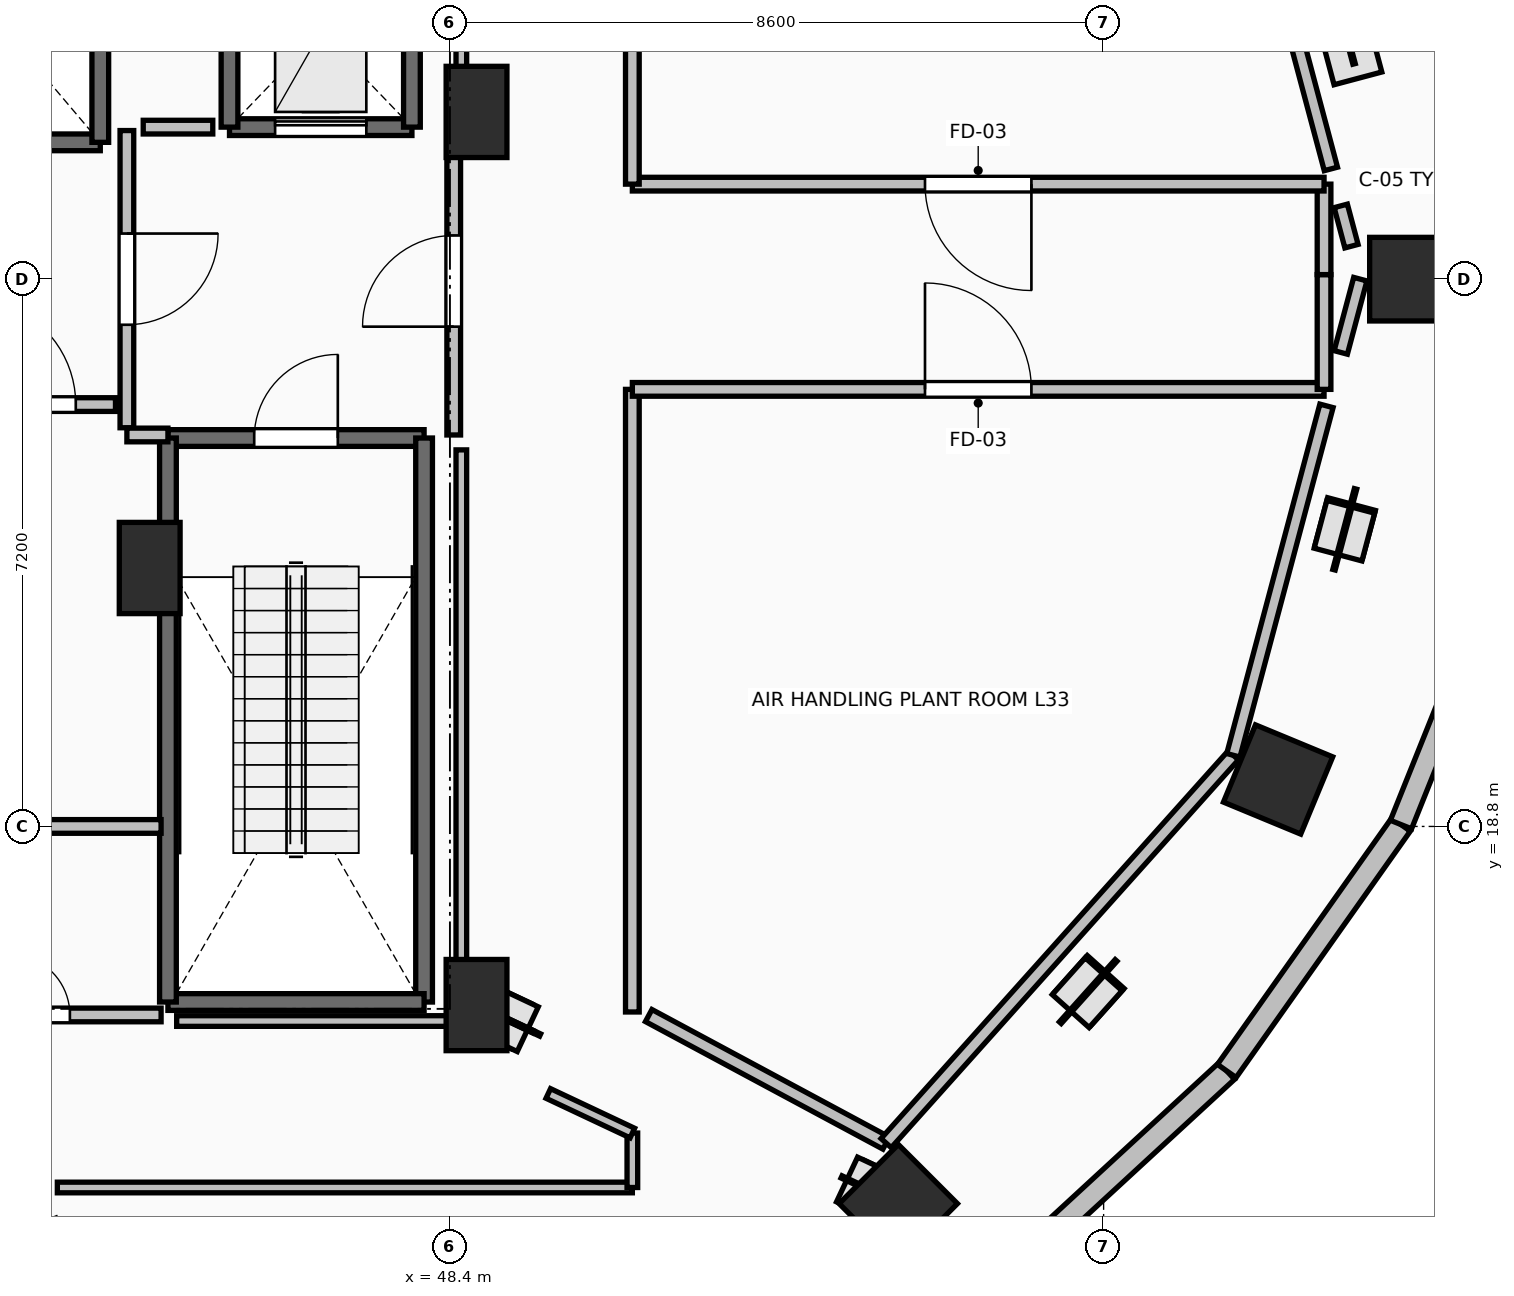
"""IFC4 building model, lengths in metres.
Left out: names, types, materials, properties, quantities, classifications, styles, units other than length and angle.
Written with IfcOpenShell. Run it as: python <this file> out.ifc"""

import sys

from ifc_helpers import new_model, si_unit, direction, frame, frame_2d, origin, origin_2d, place, context, subcontext, project, spatial, rectangle, extrude, element, fill, save


model = new_model("IFC4")
c1 = context("Model", 3, precision=1e-05, world=origin(), true_north=direction((0.0, 1.0)))
c2 = subcontext(c1, "Body", "Model", "MODEL_VIEW")
j1 = project(units=[si_unit("LENGTHUNIT", "METRE"), si_unit("PLANEANGLEUNIT", "RADIAN")], contexts=[c1])
p1 = place(None, origin())
s1 = spatial("IfcSite", under=j1, at=p1, CompositionType="ELEMENT")
p2 = place(p1, origin())
s2 = spatial("IfcBuilding", under=s1, at=p2, CompositionType="ELEMENT")
p3 = place(p2, frame((0.0, 0.0, 124.3)))
s3 = spatial("IfcBuildingStorey", under=s2, at=p3, CompositionType="ELEMENT", Elevation=124.3)
for number, where, z_axis, x_axis in (
    (1, (61.05, 26.0, 0.0), (0.0, 0.0, 1.0), (1.0, 0.0, 0.0)),
    (2, (54.299, 13.838, 0.0), (0.0, 0.0, 1.0), (0.707, -0.707, 0.0)),
    (3, (59.295, 19.418, 0.0), (0.0, 0.0, 1.0), (0.924, -0.383, 0.0)),
):
    element("IfcColumn", number, at=place(p3, frame(where, z_axis=z_axis, x_axis=x_axis)), inside=s3, PredefinedType="COLUMN", context=c2, shape_type="SweptSolid", body=[
        extrude(rectangle(XDim=1.1, YDim=1.1, at=origin_2d()), origin(), (0.0, 0.0, 1.0), 4.8),
    ])
for number, where, z_axis, x_axis in (
    (4, (48.75, 28.2, 0.0), (0.0, 0.0, 1.0), (1.0, 0.0, 0.0)),
    (5, (48.75, 16.45, 0.0), (0.0, 0.0, 1.0), (1.0, 0.0, 0.0)),
    (6, (44.45, 22.2, 0.0), (0.0, 0.0, 1.0), (1.0, 0.0, 0.0)),
):
    element("IfcColumn", number, at=place(p3, frame(where, z_axis=z_axis, x_axis=x_axis)), inside=s3, PredefinedType="PILASTER", context=c2, shape_type="SweptSolid", body=[
        extrude(rectangle(XDim=0.8, YDim=1.2, at=origin_2d()), origin(), (0.0, 0.0, 1.0), 4.8),
    ])
p4 = place(p3, frame((55.536, 12.742, 0.0), z_axis=(0.0, 0.0, 1.0), x_axis=(0.735477154165, 0.677549522693, 0.0)))
e7 = element("IfcWall", 7, at=p4, inside=s3, PredefinedType="STANDARD", context=c2, shape_type="SweptSolid", body=[
    extrude(rectangle(XDim=4.194, YDim=0.3, at=frame_2d((2.097, 0.0))), origin(), (0.0, 0.0, 1.0), 4.54),
])
p5 = place(p3, frame((58.62, 15.583, 0.0), z_axis=(0.0, 0.0, 1.0), x_axis=(0.577269753207, 0.816553508371, 0.0)))
e8 = element("IfcWall", 8, at=p5, inside=s3, PredefinedType="STANDARD", context=c2, shape_type="SweptSolid", body=[
    extrude(rectangle(XDim=3.97, YDim=0.3, at=frame_2d((1.985, 0.0))), origin(), (0.0, 0.0, 1.0), 4.54),
])
p6 = place(p3, frame((60.912, 18.825, 0.0), z_axis=(0.0, 0.0, 1.0), x_axis=(0.372401154411, 0.928071861546, 0.0)))
e9 = element("IfcWall", 9, at=p6, inside=s3, PredefinedType="STANDARD", context=c2, shape_type="SweptSolid", body=[
    extrude(rectangle(XDim=3.79, YDim=0.3, at=frame_2d((1.895, 0.0))), origin(), (0.0, 0.0, 1.0), 4.54),
])
p7 = place(p3, frame((44.69, 23.91, 0.0), z_axis=(0.0, 0.0, 1.0), x_axis=(1.0, 0.0, 0.0)))
e10 = element("IfcWall", 10, at=p7, inside=s3, PredefinedType="SOLIDWALL", context=c2, shape_type="SweptSolid", body=[
    extrude(rectangle(XDim=3.37, YDim=0.22, at=frame_2d((1.685, 0.0))), origin(), (0.0, 0.0, 1.0), 4.54),
])
p8 = place(p7, frame((1.135, 0.0, 0.0)))
e11 = element("IfcOpeningElement", 11, at=p8, cuts=e10, PredefinedType="OPENING", context=c2, shape_type="SweptSolid", body=[
    extrude(rectangle(XDim=1.1, YDim=2.15, at=frame_2d((0.55, 1.075))), frame((0.0, 0.125, 0.0), z_axis=(0.0, -1.0, 0.0), x_axis=(1.0, 0.0, 0.0)), (0.0, 0.0, 1.0), 0.25),
])
p9 = place(p3, frame((48.06, 23.91, 0.0), z_axis=(0.0, 0.0, 1.0), x_axis=(0.0, -1.0, 0.0)))
e12 = element("IfcWall", 12, at=p9, inside=s3, PredefinedType="SOLIDWALL", context=c2, shape_type="SweptSolid", body=[
    extrude(rectangle(XDim=7.42, YDim=0.22, at=frame_2d((3.71, 0.0))), origin(), (0.0, 0.0, 1.0), 4.54),
])
p10 = place(p3, frame((48.06, 16.49, 0.0), z_axis=(0.0, 0.0, 1.0), x_axis=(-1.0, 0.0, 0.0)))
e13 = element("IfcWall", 13, at=p10, inside=s3, PredefinedType="SOLIDWALL", context=c2, shape_type="SweptSolid", body=[
    extrude(rectangle(XDim=3.37, YDim=0.22, at=frame_2d((1.685, 0.0))), origin(), (0.0, 0.0, 1.0), 4.54),
])
p11 = place(p3, frame((44.69, 16.49, 0.0), z_axis=(0.0, 0.0, 1.0), x_axis=(0.0, 1.0, 0.0)))
e14 = element("IfcWall", 14, at=p11, inside=s3, PredefinedType="SOLIDWALL", context=c2, shape_type="SweptSolid", body=[
    extrude(rectangle(XDim=7.42, YDim=0.22, at=frame_2d((3.71, 0.0))), origin(), (0.0, 0.0, 1.0), 4.54),
])
p12 = place(p3, frame((41.6, 27.8, 0.0), z_axis=(0.0, 0.0, 1.0), x_axis=(1.0, 0.0, 0.0)))
e15 = element("IfcWall", 15, at=p12, inside=s3, PredefinedType="SOLIDWALL", context=c2, shape_type="SweptSolid", body=[
    extrude(rectangle(XDim=2.2, YDim=0.22, at=frame_2d((1.1, 0.0))), origin(), (0.0, 0.0, 1.0), 4.54),
])
p13 = place(p3, frame((43.8, 27.8, 0.0), z_axis=(0.0, 0.0, 1.0), x_axis=(0.0, 1.0, 0.0)))
e16 = element("IfcWall", 16, at=p13, inside=s3, PredefinedType="SOLIDWALL", context=c2, shape_type="SweptSolid", body=[
    extrude(rectangle(XDim=2.6, YDim=0.22, at=frame_2d((1.3, 0.0))), origin(), (0.0, 0.0, 1.0), 4.54),
])
p14 = place(p3, frame((45.5, 28.0, 0.0), z_axis=(0.0, 0.0, 1.0), x_axis=(1.0, 0.0, 0.0)))
e17 = element("IfcWall", 17, at=p14, inside=s3, PredefinedType="SHEAR", context=c2, shape_type="SweptSolid", body=[
    extrude(rectangle(XDim=2.4, YDim=0.22, at=frame_2d((1.2, 0.0))), origin(), (0.0, 0.0, 1.0), 4.54),
])
p15 = place(p14, frame((0.6, 0.0, 0.0)))
e18 = element("IfcOpeningElement", 18, at=p15, cuts=e17, PredefinedType="OPENING", context=c2, shape_type="SweptSolid", body=[
    extrude(rectangle(XDim=1.2, YDim=2.2, at=frame_2d((0.6, 1.1))), frame((0.0, 0.125, 0.0), z_axis=(0.0, -1.0, 0.0), x_axis=(1.0, 0.0, 0.0)), (0.0, 0.0, 1.0), 0.25),
])
for number, where, z_axis, x_axis in (
    (19, (47.9, 28.0, 0.0), (0.0, 0.0, 1.0), (0.0, 1.0, 0.0)),
    (20, (45.5, 30.5, 0.0), (0.0, 0.0, 1.0), (0.0, -1.0, 0.0)),
):
    element("IfcWall", number, at=place(p3, frame(where, z_axis=z_axis, x_axis=x_axis)), inside=s3, PredefinedType="SHEAR", context=c2, shape_type="SweptSolid", body=[
        extrude(rectangle(XDim=2.5, YDim=0.22, at=frame_2d((1.25, 0.0))), origin(), (0.0, 0.0, 1.0), 4.54),
    ])
p16 = place(p3, frame((44.15, 27.955, 0.0), z_axis=(0.0, 0.0, 1.0), x_axis=(0.0, -1.0, 0.0)))
e21 = element("IfcWall", 21, at=p16, inside=s3, PredefinedType="PARTITIONING", context=c2, shape_type="SweptSolid", body=[
    extrude(rectangle(XDim=3.91, YDim=0.18, at=frame_2d((1.955, 0.0))), origin(), (0.0, 0.0, 1.0), 4.54),
])
p17 = place(p16, frame((1.355, 0.0, 0.0)))
e22 = element("IfcOpeningElement", 22, at=p17, cuts=e21, PredefinedType="OPENING", context=c2, shape_type="SweptSolid", body=[
    extrude(rectangle(XDim=1.2, YDim=2.15, at=frame_2d((0.6, 1.075))), frame((0.0, 0.105, 0.0), z_axis=(0.0, -1.0, 0.0), x_axis=(1.0, 0.0, 0.0)), (0.0, 0.0, 1.0), 0.21),
])
p18 = place(p3, frame((44.15, 23.95, 0.0), z_axis=(0.0, 0.0, 1.0), x_axis=(1.0, 0.0, 0.0)))
e23 = element("IfcWall", 23, at=p18, inside=s3, PredefinedType="PARTITIONING", context=c2, shape_type="SweptSolid", body=[
    extrude(rectangle(XDim=0.54, YDim=0.18, at=frame_2d((0.27, 0.0))), origin(), (0.0, 0.0, 1.0), 4.54),
])
p19 = place(p3, frame((48.45, 23.95, 0.0), z_axis=(0.0, 0.0, 1.0), x_axis=(0.0, 1.0, 0.0)))
e24 = element("IfcWall", 24, at=p19, inside=s3, PredefinedType="PARTITIONING", context=c2, shape_type="SweptSolid", body=[
    extrude(rectangle(XDim=4.05, YDim=0.18, at=frame_2d((2.025, 0.0))), origin(), (0.0, 0.0, 1.0), 3.522),
])
p20 = place(p19, frame((1.425, 0.0, 0.0)))
e25 = element("IfcOpeningElement", 25, at=p20, cuts=e24, PredefinedType="OPENING", context=c2, shape_type="SweptSolid", body=[
    extrude(rectangle(XDim=1.2, YDim=2.15, at=frame_2d((0.6, 1.075))), frame((0.0, 0.105, 0.0), z_axis=(0.0, -1.0, 0.0), x_axis=(1.0, 0.0, 0.0)), (0.0, 0.0, 1.0), 0.21),
])
p21 = place(p3, frame((41.555, 24.35, 0.0), z_axis=(0.0, 0.0, 1.0), x_axis=(1.0, 0.0, 0.0)))
e26 = element("IfcWall", 26, at=p21, inside=s3, PredefinedType="PARTITIONING", context=c2, shape_type="SweptSolid", body=[
    extrude(rectangle(XDim=2.445, YDim=0.18, at=frame_2d((1.223, 0.0))), origin(), (0.0, 0.0, 1.0), 4.54),
])
p22 = place(p21, frame((0.522, 0.0, 0.0)))
e27 = element("IfcOpeningElement", 27, at=p22, cuts=e26, PredefinedType="OPENING", context=c2, shape_type="SweptSolid", body=[
    extrude(rectangle(XDim=1.4, YDim=2.2, at=frame_2d((0.7, 1.1))), frame((0.0, 0.105, 0.0), z_axis=(0.0, -1.0, 0.0), x_axis=(1.0, 0.0, 0.0)), (0.0, 0.0, 1.0), 0.21),
])
p23 = place(p3, frame((44.6, 18.8, 0.0), z_axis=(0.0, 0.0, 1.0), x_axis=(-1.0, 0.0, 0.0)))
e28 = element("IfcWall", 28, at=p23, inside=s3, PredefinedType="PARTITIONING", context=c2, shape_type="SweptSolid", body=[
    extrude(rectangle(XDim=3.2, YDim=0.18, at=frame_2d((1.6, 0.0))), origin(), (0.0, 0.0, 1.0), 4.54),
])
p24 = place(p3, frame((41.4, 16.32, 0.0), z_axis=(0.0, 0.0, 1.0), x_axis=(1.0, 0.0, 0.0)))
e29 = element("IfcWall", 29, at=p24, inside=s3, PredefinedType="PARTITIONING", context=c2, shape_type="SweptSolid", body=[
    extrude(rectangle(XDim=3.2, YDim=0.18, at=frame_2d((1.6, 0.0))), origin(), (0.0, 0.0, 1.0), 4.54),
])
p25 = place(p24, frame((1.2, 0.0, 0.0)))
e30 = element("IfcOpeningElement", 30, at=p25, cuts=e29, PredefinedType="OPENING", context=c2, shape_type="SweptSolid", body=[
    extrude(rectangle(XDim=0.8, YDim=2.05, at=frame_2d((0.4, 1.025))), frame((0.0, 0.105, 0.0), z_axis=(0.0, -1.0, 0.0), x_axis=(1.0, 0.0, 0.0)), (0.0, 0.0, 1.0), 0.21),
])
p26 = place(p3, frame((50.8, 16.359, 0.0), z_axis=(0.0, 0.0, 1.0), x_axis=(0.0, 1.0, 0.0)))
e31 = element("IfcWall", 31, at=p26, inside=s3, PredefinedType="PARTITIONING", context=c2, shape_type="SweptSolid", body=[
    extrude(rectangle(XDim=8.191, YDim=0.18, at=frame_2d((4.096, 0.0))), origin(), (0.0, 0.0, 1.0), 4.174),
])
p27 = place(p3, frame((50.8, 24.55, 0.0), z_axis=(0.0, 0.0, 1.0), x_axis=(1.0, 0.0, 0.0)))
e32 = element("IfcWall", 32, at=p27, inside=s3, PredefinedType="PARTITIONING", context=c2, shape_type="SweptSolid", body=[
    extrude(rectangle(XDim=9.1, YDim=0.18, at=frame_2d((4.55, 0.0))), origin(), (0.0, 0.0, 1.0), 3.522),
])
p28 = place(p27, frame((3.85, 0.0, 0.0)))
e33 = element("IfcOpeningElement", 33, at=p28, cuts=e32, PredefinedType="OPENING", context=c2, shape_type="SweptSolid", body=[
    extrude(rectangle(XDim=1.4, YDim=2.2, at=frame_2d((0.7, 1.1))), frame((0.0, 0.105, 0.0), z_axis=(0.0, -1.0, 0.0), x_axis=(1.0, 0.0, 0.0)), (0.0, 0.0, 1.0), 0.21),
])
p29 = place(p3, frame((59.9, 24.55, 0.0), z_axis=(0.0, 0.0, 1.0), x_axis=(0.0, 1.0, 0.0)))
e34 = element("IfcWall", 34, at=p29, inside=s3, PredefinedType="PARTITIONING", context=c2, shape_type="SweptSolid", body=[
    extrude(rectangle(XDim=1.51, YDim=0.18, at=frame_2d((0.755, 0.0))), origin(), (0.0, 0.0, 1.0), 3.522),
])
p30 = place(p3, frame((59.9, 26.06, 0.0), z_axis=(0.0, 0.0, 1.0), x_axis=(0.0, 1.0, 0.0)))
e35 = element("IfcWall", 35, at=p30, inside=s3, PredefinedType="PARTITIONING", context=c2, shape_type="SweptSolid", body=[
    extrude(rectangle(XDim=1.19, YDim=0.18, at=frame_2d((0.595, 0.0))), origin(), (0.0, 0.0, 1.0), 3.522),
])
p31 = place(p3, frame((59.9, 27.25, 0.0), z_axis=(0.0, 0.0, 1.0), x_axis=(-1.0, 0.0, 0.0)))
e36 = element("IfcWall", 36, at=p31, inside=s3, PredefinedType="PARTITIONING", context=c2, shape_type="SweptSolid", body=[
    extrude(rectangle(XDim=9.1, YDim=0.18, at=frame_2d((4.55, 0.0))), origin(), (0.0, 0.0, 1.0), 3.522),
])
p32 = place(p31, frame((3.85, 0.0, 0.0)))
e37 = element("IfcOpeningElement", 37, at=p32, cuts=e36, PredefinedType="OPENING", context=c2, shape_type="SweptSolid", body=[
    extrude(rectangle(XDim=1.4, YDim=2.2, at=frame_2d((0.7, 1.1))), frame((0.0, 0.105, 0.0), z_axis=(0.0, -1.0, 0.0), x_axis=(1.0, 0.0, 0.0)), (0.0, 0.0, 1.0), 0.21),
])
p33 = place(p3, frame((50.8, 27.25, 0.0), z_axis=(0.0, 0.0, 1.0), x_axis=(0.0, 1.0, 0.0)))
e38 = element("IfcWall", 38, at=p33, inside=s3, PredefinedType="PARTITIONING", context=c2, shape_type="SweptSolid", body=[
    extrude(rectangle(XDim=5.328, YDim=0.18, at=frame_2d((2.664, 0.0))), origin(), (0.0, 0.0, 1.0), 3.522),
])
p34 = place(p3, frame((45.28, 28.0, 0.0), z_axis=(0.0, 0.0, 1.0), x_axis=(-1.0, 0.0, 0.0)))
e39 = element("IfcWall", 39, at=p34, inside=s3, PredefinedType="PARTITIONING", context=c2, shape_type="SweptSolid", body=[
    extrude(rectangle(XDim=0.915, YDim=0.18, at=frame_2d((0.458, 0.0))), origin(), (0.0, 0.0, 1.0), 4.54),
])
p35 = place(p3, frame((43.235, 14.05, 0.0), z_axis=(0.0, 0.0, 1.0), x_axis=(1.0, 0.0, 0.0)))
e40 = element("IfcWall", 40, at=p35, inside=s3, PredefinedType="PARTITIONING", context=c2, shape_type="SweptSolid", body=[
    extrude(rectangle(XDim=7.565, YDim=0.14, at=frame_2d((3.782, 0.0))), origin(), (0.0, 0.0, 1.0), 3.522),
])
p36 = place(p3, frame((50.8, 14.05, 0.0), z_axis=(0.0, 0.0, 1.0), x_axis=(0.0, 1.0, 0.0)))
e41 = element("IfcWall", 41, at=p36, inside=s3, PredefinedType="PARTITIONING", context=c2, shape_type="SweptSolid", body=[
    extrude(rectangle(XDim=0.716, YDim=0.14, at=frame_2d((0.358, 0.0))), origin(), (0.0, 0.0, 1.0), 4.229),
])
p37 = place(p3, frame((50.8, 14.766, 0.0), z_axis=(0.0, 0.0, 1.0), x_axis=(-0.904646647719, 0.426162460537, 0.0)))
e42 = element("IfcWall", 42, at=p37, inside=s3, PredefinedType="PARTITIONING", context=c2, shape_type="SweptSolid", body=[
    extrude(rectangle(XDim=1.222, YDim=0.14, at=frame_2d((0.611, 0.0))), origin(), (0.0, 0.0, 1.0), 4.174),
])
p38 = place(p3, frame((44.805, 16.24, 0.0), z_axis=(0.0, 0.0, 1.0), x_axis=(1.0, 0.0, 0.0)))
e43 = element("IfcWall", 43, at=p38, inside=s3, PredefinedType="PARTITIONING", context=c2, shape_type="SweptSolid", body=[
    extrude(rectangle(XDim=3.745, YDim=0.14, at=frame_2d((1.873, 0.0))), origin(), (0.0, 0.0, 1.0), 3.522),
])
p39 = place(p3, frame((48.55, 16.24, 0.0), z_axis=(0.0, 0.0, 1.0), x_axis=(0.0, 1.0, 0.0)))
e44 = element("IfcWall", 44, at=p39, inside=s3, PredefinedType="PARTITIONING", context=c2, shape_type="SweptSolid", body=[
    extrude(rectangle(XDim=7.514, YDim=0.14, at=frame_2d((3.757, 0.0))), origin(), (0.0, 0.0, 1.0), 3.522),
])
p40 = place(p3, frame((48.55, 28.196, 0.0), z_axis=(0.0, 0.0, 1.0), x_axis=(0.0, 1.0, 0.0)))
e45 = element("IfcWall", 45, at=p40, inside=s3, PredefinedType="PARTITIONING", context=c2, shape_type="SweptSolid", body=[
    extrude(rectangle(XDim=5.254, YDim=0.14, at=frame_2d((2.627, 0.0))), origin(), (0.0, 0.0, 1.0), 3.522),
])
p41 = place(p3, frame((51.015, 16.312, 0.0), z_axis=(0.0, 0.0, 1.0), x_axis=(0.880963604882, -0.473184030662, 0.0)))
e46 = element("IfcWall", 46, at=p41, inside=s3, PredefinedType="PARTITIONING", context=c2, shape_type="SweptSolid", body=[
    extrude(rectangle(XDim=3.546, YDim=0.18, at=frame_2d((1.773, 0.0))), origin(), (0.0, 0.0, 1.0), 4.174),
])
p42 = place(p3, frame((54.139, 14.634, 0.0), z_axis=(0.0, 0.0, 1.0), x_axis=(0.667048046009, 0.745014700738, 0.0)))
e47 = element("IfcWall", 47, at=p42, inside=s3, PredefinedType="PARTITIONING", context=c2, shape_type="SweptSolid", body=[
    extrude(rectangle(XDim=6.848, YDim=0.18, at=frame_2d((3.424, 0.0))), origin(), (0.0, 0.0, 1.0), 3.522),
])
p43 = place(p3, frame((58.707, 19.736, 0.0), z_axis=(0.0, 0.0, 1.0), x_axis=(0.257467803187, 0.966286877859, 0.0)))
e48 = element("IfcWall", 48, at=p43, inside=s3, PredefinedType="PARTITIONING", context=c2, shape_type="SweptSolid", body=[
    extrude(rectangle(XDim=4.757, YDim=0.18, at=frame_2d((2.379, 0.0))), origin(), (0.0, 0.0, 1.0), 3.522),
])
p44 = place(p3, frame((60.12, 25.036, 0.0), z_axis=(0.0, 0.0, 1.0), x_axis=(0.257418962866, 0.966299890074, 0.0)))
e49 = element("IfcWall", 49, at=p44, inside=s3, PredefinedType="PARTITIONING", context=c2, shape_type="SweptSolid", body=[
    extrude(rectangle(XDim=0.998, YDim=0.18, at=frame_2d((0.499, 0.0))), origin(), (0.0, 0.0, 1.0), 3.522),
])
p45 = place(p3, frame((60.261, 26.434, 0.0), z_axis=(0.0, 0.0, 1.0), x_axis=(-0.256859051488, 0.966448874835, 0.0)))
e50 = element("IfcWall", 50, at=p45, inside=s3, PredefinedType="PARTITIONING", context=c2, shape_type="SweptSolid", body=[
    extrude(rectangle(XDim=0.548, YDim=0.18, at=frame_2d((0.274, 0.0))), origin(), (0.0, 0.0, 1.0), 3.522),
])
p46 = place(p3, frame((59.99, 27.45, 0.0), z_axis=(0.0, 0.0, 1.0), x_axis=(-0.257483550771, 0.966282681767, 0.0)))
e51 = element("IfcWall", 51, at=p46, inside=s3, PredefinedType="PARTITIONING", context=c2, shape_type="SweptSolid", body=[
    extrude(rectangle(XDim=4.921, YDim=0.18, at=frame_2d((2.46, 0.0))), origin(), (0.0, 0.0, 1.0), 4.54),
])
p47 = place(p8, origin())
e52 = element("IfcDoor", 52, at=p47, inside=s3, OperationType="SINGLE_SWING_RIGHT", PredefinedType="DOOR", context=c2, shape_type="SweptSolid", body=[
    extrude(rectangle(XDim=1.1, YDim=2.15, at=frame_2d((0.55, 1.075))), frame((0.0, 0.025, 0.0), z_axis=(0.0, -1.0, 0.0), x_axis=(1.0, 0.0, 0.0)), (0.0, 0.0, 1.0), 0.05),
])
fill(e11, e52)
p48 = place(p15, origin())
e53 = element("IfcDoor", 53, at=p48, inside=s3, OperationType="SLIDING_TO_LEFT", PredefinedType="DOOR", context=c2, shape_type="SweptSolid", body=[
    extrude(rectangle(XDim=1.2, YDim=2.2, at=frame_2d((0.6, 1.1))), frame((0.0, 0.025, 0.0), z_axis=(0.0, -1.0, 0.0), x_axis=(1.0, 0.0, 0.0)), (0.0, 0.0, 1.0), 0.05),
])
fill(e18, e53)
p49 = place(p17, origin())
e54 = element("IfcDoor", 54, at=p49, inside=s3, OperationType="SINGLE_SWING_LEFT", PredefinedType="DOOR", context=c2, shape_type="SweptSolid", body=[
    extrude(rectangle(XDim=1.2, YDim=2.15, at=frame_2d((0.6, 1.075))), frame((0.0, 0.025, 0.0), z_axis=(0.0, -1.0, 0.0), x_axis=(1.0, 0.0, 0.0)), (0.0, 0.0, 1.0), 0.05),
])
fill(e22, e54)
p50 = place(p20, origin())
e55 = element("IfcDoor", 55, at=p50, inside=s3, OperationType="SINGLE_SWING_LEFT", PredefinedType="DOOR", context=c2, shape_type="SweptSolid", body=[
    extrude(rectangle(XDim=1.2, YDim=2.15, at=frame_2d((0.6, 1.075))), frame((0.0, 0.025, 0.0), z_axis=(0.0, -1.0, 0.0), x_axis=(1.0, 0.0, 0.0)), (0.0, 0.0, 1.0), 0.05),
])
fill(e25, e55)
p51 = place(p22, origin())
e56 = element("IfcDoor", 56, at=p51, inside=s3, OperationType="DOUBLE_SWING_LEFT", PredefinedType="DOOR", context=c2, shape_type="SweptSolid", body=[
    extrude(rectangle(XDim=1.4, YDim=2.2, at=frame_2d((0.7, 1.1))), frame((0.0, 0.025, 0.0), z_axis=(0.0, -1.0, 0.0), x_axis=(1.0, 0.0, 0.0)), (0.0, 0.0, 1.0), 0.05),
])
fill(e27, e56)
p52 = place(p25, origin())
e57 = element("IfcDoor", 57, at=p52, inside=s3, OperationType="SINGLE_SWING_LEFT", PredefinedType="DOOR", context=c2, shape_type="SweptSolid", body=[
    extrude(rectangle(XDim=0.8, YDim=2.05, at=frame_2d((0.4, 1.025))), frame((0.0, 0.025, 0.0), z_axis=(0.0, -1.0, 0.0), x_axis=(1.0, 0.0, 0.0)), (0.0, 0.0, 1.0), 0.05),
])
fill(e30, e57)
p53 = place(p28, origin())
e58 = element("IfcDoor", 58, at=p53, inside=s3, OperationType="DOUBLE_SWING_LEFT", PredefinedType="DOOR", context=c2, shape_type="SweptSolid", body=[
    extrude(rectangle(XDim=1.4, YDim=2.2, at=frame_2d((0.7, 1.1))), frame((0.0, 0.025, 0.0), z_axis=(0.0, -1.0, 0.0), x_axis=(1.0, 0.0, 0.0)), (0.0, 0.0, 1.0), 0.05),
])
fill(e33, e58)
p54 = place(p32, origin())
e59 = element("IfcDoor", 59, at=p54, inside=s3, OperationType="DOUBLE_SWING_LEFT", PredefinedType="DOOR", context=c2, shape_type="SweptSolid", body=[
    extrude(rectangle(XDim=1.4, YDim=2.2, at=frame_2d((0.7, 1.1))), frame((0.0, 0.025, 0.0), z_axis=(0.0, -1.0, 0.0), x_axis=(1.0, 0.0, 0.0)), (0.0, 0.0, 1.0), 0.05),
])
fill(e37, e59)
save(model, sys.argv[1])
